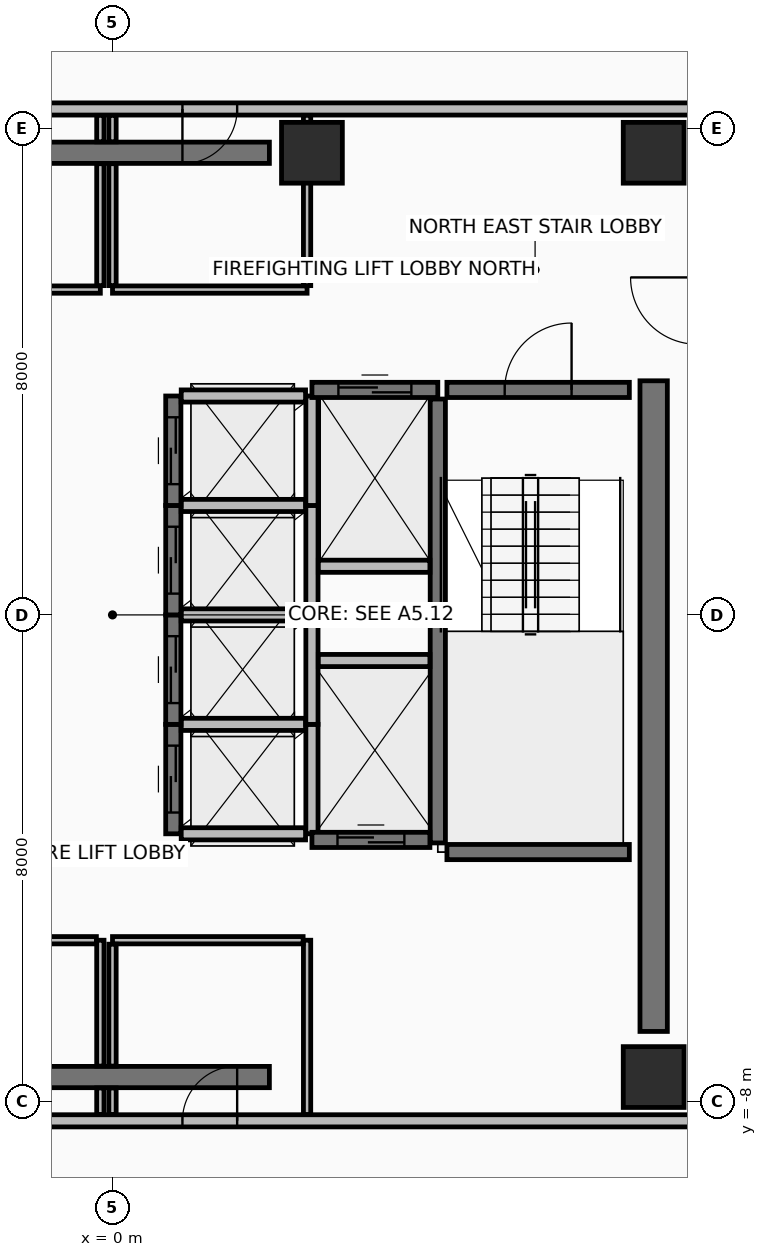
"""IFC4 building model, lengths in metres.
Left out: names, types, materials, properties, quantities, classifications, styles, units other than length and angle.
Written with IfcOpenShell. Run it as: python <this file> out.ifc"""

import sys

from ifc_helpers import new_model, si_unit, direction, frame, frame_2d, origin, origin_2d, place, context, subcontext, project, spatial, rectangle, extrude, element, fill, save


model = new_model("IFC4")
c1 = context("Model", 3, precision=1e-05, world=origin(), true_north=direction((0.0, 1.0)))
c2 = subcontext(c1, "Body", "Model", "MODEL_VIEW")
j1 = project(units=[si_unit("LENGTHUNIT", "METRE"), si_unit("PLANEANGLEUNIT", "RADIAN")], contexts=[c1])
p1 = place(None, origin())
s1 = spatial("IfcSite", under=j1, at=p1, CompositionType="ELEMENT")
p2 = place(p1, origin())
s2 = spatial("IfcBuilding", under=s1, at=p2, CompositionType="ELEMENT")
p3 = place(p2, frame((0.0, 0.0, 241.45)))
s3 = spatial("IfcBuildingStorey", under=s2, at=p3, CompositionType="ELEMENT", Elevation=241.45)
for number, where, z_axis, x_axis in (
    (1, (8.9, -7.6, 0.0), (0.0, 0.0, 1.0), (1.0, 0.0, 0.0)),
    (2, (8.9, 7.6, 0.0), (0.0, 0.0, 1.0), (1.0, 0.0, 0.0)),
    (3, (3.28, 7.6, 0.0), (0.0, 0.0, 1.0), (1.0, 0.0, 0.0)),
):
    element("IfcColumn", number, at=place(p3, frame(where, z_axis=z_axis, x_axis=x_axis)), inside=s3, PredefinedType="COLUMN", context=c2, shape_type="SweptSolid", body=[
        extrude(rectangle(XDim=1.0, YDim=1.0, at=origin_2d()), origin(), (0.0, 0.0, 1.0), 3.6),
    ])
for number, where, z_axis, x_axis in (
    (4, (-2.8, -7.6, 0.0), (0.0, 0.0, 1.0), (1.0, 0.0, 0.0)),
    (5, (-2.8, 7.6, 0.0), (0.0, 0.0, 1.0), (1.0, 0.0, 0.0)),
):
    element("IfcWall", number, at=place(p3, frame(where, z_axis=z_axis, x_axis=x_axis)), inside=s3, PredefinedType="SHEAR", context=c2, shape_type="SweptSolid", body=[
        extrude(rectangle(XDim=5.38, YDim=0.35, at=frame_2d((2.69, 0.0))), origin(), (0.0, 0.0, 1.0), 3.42),
    ])
p4 = place(p3, frame((8.9, -6.85, 0.0), z_axis=(0.0, 0.0, 1.0), x_axis=(0.0, 1.0, 0.0)))
e6 = element("IfcWall", 6, at=p4, inside=s3, PredefinedType="SHEAR", context=c2, shape_type="SweptSolid", body=[
    extrude(rectangle(XDim=10.7, YDim=0.45, at=frame_2d((5.35, 0.0))), origin(), (0.0, 0.0, 1.0), 3.42),
])
p5 = place(p3, frame((-9.62, -8.32, 0.0), z_axis=(0.0, 0.0, 1.0), x_axis=(1.0, 0.0, 0.0)))
e7 = element("IfcWall", 7, at=p5, inside=s3, PredefinedType="PARTITIONING", context=c2, shape_type="SweptSolid", body=[
    extrude(rectangle(XDim=19.24, YDim=0.2, at=frame_2d((9.62, 0.0))), origin(), (0.0, 0.0, 1.0), 2.915),
])
p6 = place(p5, frame((7.37, 0.0, 0.0)))
e8 = element("IfcOpeningElement", 8, at=p6, cuts=e7, PredefinedType="OPENING", context=c2, shape_type="SweptSolid", body=[
    extrude(rectangle(XDim=0.9, YDim=2.1, at=frame_2d((0.45, 1.05))), frame((0.0, 0.11, 0.0), z_axis=(0.0, -1.0, 0.0), x_axis=(1.0, 0.0, 0.0)), (0.0, 0.0, 1.0), 0.22),
])
p7 = place(p5, frame((10.77, 0.0, 0.0)))
e9 = element("IfcOpeningElement", 9, at=p7, cuts=e7, PredefinedType="OPENING", context=c2, shape_type="SweptSolid", body=[
    extrude(rectangle(XDim=0.9, YDim=2.1, at=frame_2d((0.45, 1.05))), frame((0.0, 0.11, 0.0), z_axis=(0.0, -1.0, 0.0), x_axis=(1.0, 0.0, 0.0)), (0.0, 0.0, 1.0), 0.22),
])
p8 = place(p3, frame((9.62, 8.32, 0.0), z_axis=(0.0, 0.0, 1.0), x_axis=(-1.0, 0.0, 0.0)))
e10 = element("IfcWall", 10, at=p8, inside=s3, PredefinedType="PARTITIONING", context=c2, shape_type="SweptSolid", body=[
    extrude(rectangle(XDim=19.24, YDim=0.2, at=frame_2d((9.62, 0.0))), origin(), (0.0, 0.0, 1.0), 2.915),
])
p9 = place(p8, frame((10.97, 0.0, 0.0)))
e11 = element("IfcOpeningElement", 11, at=p9, cuts=e10, PredefinedType="OPENING", context=c2, shape_type="SweptSolid", body=[
    extrude(rectangle(XDim=0.9, YDim=2.1, at=frame_2d((0.45, 1.05))), frame((0.0, 0.11, 0.0), z_axis=(0.0, -1.0, 0.0), x_axis=(1.0, 0.0, 0.0)), (0.0, 0.0, 1.0), 0.22),
])
p10 = place(p8, frame((7.57, 0.0, 0.0)))
e12 = element("IfcOpeningElement", 12, at=p10, cuts=e10, PredefinedType="OPENING", context=c2, shape_type="SweptSolid", body=[
    extrude(rectangle(XDim=0.9, YDim=2.1, at=frame_2d((0.45, 1.05))), frame((0.0, 0.11, 0.0), z_axis=(0.0, -1.0, 0.0), x_axis=(1.0, 0.0, 0.0)), (0.0, 0.0, 1.0), 0.22),
])
p11 = place(p8, frame((15.02, 0.0, 0.0)))
e13 = element("IfcOpeningElement", 13, at=p11, cuts=e10, PredefinedType="OPENING", context=c2, shape_type="SweptSolid", body=[
    extrude(rectangle(XDim=0.9, YDim=2.1, at=frame_2d((0.45, 1.05))), frame((0.0, 0.11, 0.0), z_axis=(0.0, -1.0, 0.0), x_axis=(1.0, 0.0, 0.0)), (0.0, 0.0, 1.0), 0.22),
])
p12 = place(p3, frame((5.35, -3.75, 0.0), z_axis=(0.0, 0.0, 1.0), x_axis=(0.0, 1.0, 0.0)))
e14 = element("IfcWall", 14, at=p12, inside=s3, PredefinedType="SHEAR", context=c2, shape_type="SweptSolid", body=[
    extrude(rectangle(XDim=7.3, YDim=0.25, at=frame_2d((3.65, 0.0))), origin(), (0.0, 0.0, 1.0), 3.42),
])
p13 = place(p3, frame((5.5, 3.7, 0.0), z_axis=(0.0, 0.0, 1.0), x_axis=(1.0, 0.0, 0.0)))
e15 = element("IfcWall", 15, at=p13, inside=s3, PredefinedType="SHEAR", context=c2, shape_type="SweptSolid", body=[
    extrude(rectangle(XDim=3.0, YDim=0.25, at=frame_2d((1.5, 0.0))), origin(), (0.0, 0.0, 1.0), 3.42),
])
p14 = place(p13, frame((0.95, 0.0, 0.0)))
e16 = element("IfcOpeningElement", 16, at=p14, cuts=e15, PredefinedType="OPENING", context=c2, shape_type="SweptSolid", body=[
    extrude(rectangle(XDim=1.1, YDim=2.15, at=frame_2d((0.55, 1.075))), frame((0.0, 0.135, 0.0), z_axis=(0.0, -1.0, 0.0), x_axis=(1.0, 0.0, 0.0)), (0.0, 0.0, 1.0), 0.27),
])
p15 = place(p3, frame((5.5, -3.9, 0.0), z_axis=(0.0, 0.0, 1.0), x_axis=(1.0, 0.0, 0.0)))
e17 = element("IfcWall", 17, at=p15, inside=s3, PredefinedType="SHEAR", context=c2, shape_type="SweptSolid", body=[
    extrude(rectangle(XDim=3.0, YDim=0.25, at=frame_2d((1.5, 0.0))), origin(), (0.0, 0.0, 1.0), 3.42),
])
p16 = place(p3, frame((1.0, -3.6, 0.0), z_axis=(0.0, 0.0, 1.0), x_axis=(0.0, 1.0, 0.0)))
e18 = element("IfcWall", 18, at=p16, inside=s3, PredefinedType="SHEAR", context=c2, shape_type="SweptSolid", body=[
    extrude(rectangle(XDim=1.8, YDim=0.25, at=frame_2d((0.9, 0.0))), origin(), (0.0, 0.0, 1.0), 3.42),
])
p17 = place(p16, frame((0.35, 0.0, 0.0)))
e19 = element("IfcOpeningElement", 19, at=p17, cuts=e18, PredefinedType="OPENING", context=c2, shape_type="SweptSolid", body=[
    extrude(rectangle(XDim=1.1, YDim=2.2, at=frame_2d((0.55, 1.1))), frame((0.0, 0.135, 0.0), z_axis=(0.0, -1.0, 0.0), x_axis=(1.0, 0.0, 0.0)), (0.0, 0.0, 1.0), 0.27),
])
p18 = place(p3, frame((3.28, -3.6, 0.0), z_axis=(0.0, 0.0, 1.0), x_axis=(0.0, 1.0, 0.0)))
e20 = element("IfcWall", 20, at=p18, inside=s3, PredefinedType="PARTITIONING", context=c2, shape_type="SweptSolid", body=[
    extrude(rectangle(XDim=1.8, YDim=0.2, at=frame_2d((0.9, 0.0))), origin(), (0.0, 0.0, 1.0), 3.42),
])
for number, where, z_axis, x_axis in (
    (21, (1.13, -3.6, 0.0), (0.0, 0.0, 1.0), (1.0, 0.0, 0.0)),
    (22, (1.13, -1.8, 0.0), (0.0, 0.0, 1.0), (1.0, 0.0, 0.0)),
):
    element("IfcWall", number, at=place(p3, frame(where, z_axis=z_axis, x_axis=x_axis)), inside=s3, PredefinedType="PARTITIONING", context=c2, shape_type="SweptSolid", body=[
        extrude(rectangle(XDim=2.045, YDim=0.2, at=frame_2d((1.022, 0.0))), origin(), (0.0, 0.0, 1.0), 3.42),
    ])
p19 = place(p3, frame((1.0, -1.8, 0.0), z_axis=(0.0, 0.0, 1.0), x_axis=(0.0, 1.0, 0.0)))
e23 = element("IfcWall", 23, at=p19, inside=s3, PredefinedType="SHEAR", context=c2, shape_type="SweptSolid", body=[
    extrude(rectangle(XDim=1.8, YDim=0.25, at=frame_2d((0.9, 0.0))), origin(), (0.0, 0.0, 1.0), 3.42),
])
p20 = place(p19, frame((0.35, 0.0, 0.0)))
e24 = element("IfcOpeningElement", 24, at=p20, cuts=e23, PredefinedType="OPENING", context=c2, shape_type="SweptSolid", body=[
    extrude(rectangle(XDim=1.1, YDim=2.2, at=frame_2d((0.55, 1.1))), frame((0.0, 0.135, 0.0), z_axis=(0.0, -1.0, 0.0), x_axis=(1.0, 0.0, 0.0)), (0.0, 0.0, 1.0), 0.27),
])
p21 = place(p3, frame((3.28, -1.8, 0.0), z_axis=(0.0, 0.0, 1.0), x_axis=(0.0, 1.0, 0.0)))
e25 = element("IfcWall", 25, at=p21, inside=s3, PredefinedType="PARTITIONING", context=c2, shape_type="SweptSolid", body=[
    extrude(rectangle(XDim=1.8, YDim=0.2, at=frame_2d((0.9, 0.0))), origin(), (0.0, 0.0, 1.0), 3.42),
])
p22 = place(p3, frame((1.13, 0.0, 0.0), z_axis=(0.0, 0.0, 1.0), x_axis=(1.0, 0.0, 0.0)))
e26 = element("IfcWall", 26, at=p22, inside=s3, PredefinedType="PARTITIONING", context=c2, shape_type="SweptSolid", body=[
    extrude(rectangle(XDim=2.045, YDim=0.2, at=frame_2d((1.022, 0.0))), origin(), (0.0, 0.0, 1.0), 3.42),
])
p23 = place(p3, frame((1.0, 0.0, 0.0), z_axis=(0.0, 0.0, 1.0), x_axis=(0.0, 1.0, 0.0)))
e27 = element("IfcWall", 27, at=p23, inside=s3, PredefinedType="SHEAR", context=c2, shape_type="SweptSolid", body=[
    extrude(rectangle(XDim=1.8, YDim=0.25, at=frame_2d((0.9, 0.0))), origin(), (0.0, 0.0, 1.0), 3.42),
])
p24 = place(p23, frame((0.35, 0.0, 0.0)))
e28 = element("IfcOpeningElement", 28, at=p24, cuts=e27, PredefinedType="OPENING", context=c2, shape_type="SweptSolid", body=[
    extrude(rectangle(XDim=1.1, YDim=2.2, at=frame_2d((0.55, 1.1))), frame((0.0, 0.135, 0.0), z_axis=(0.0, -1.0, 0.0), x_axis=(1.0, 0.0, 0.0)), (0.0, 0.0, 1.0), 0.27),
])
p25 = place(p3, frame((3.28, 0.0, 0.0), z_axis=(0.0, 0.0, 1.0), x_axis=(0.0, 1.0, 0.0)))
e29 = element("IfcWall", 29, at=p25, inside=s3, PredefinedType="PARTITIONING", context=c2, shape_type="SweptSolid", body=[
    extrude(rectangle(XDim=1.8, YDim=0.2, at=frame_2d((0.9, 0.0))), origin(), (0.0, 0.0, 1.0), 3.42),
])
p26 = place(p3, frame((1.13, 1.8, 0.0), z_axis=(0.0, 0.0, 1.0), x_axis=(1.0, 0.0, 0.0)))
e30 = element("IfcWall", 30, at=p26, inside=s3, PredefinedType="PARTITIONING", context=c2, shape_type="SweptSolid", body=[
    extrude(rectangle(XDim=2.045, YDim=0.2, at=frame_2d((1.022, 0.0))), origin(), (0.0, 0.0, 1.0), 3.42),
])
p27 = place(p3, frame((1.0, 1.8, 0.0), z_axis=(0.0, 0.0, 1.0), x_axis=(0.0, 1.0, 0.0)))
e31 = element("IfcWall", 31, at=p27, inside=s3, PredefinedType="SHEAR", context=c2, shape_type="SweptSolid", body=[
    extrude(rectangle(XDim=1.8, YDim=0.25, at=frame_2d((0.9, 0.0))), origin(), (0.0, 0.0, 1.0), 3.42),
])
p28 = place(p27, frame((0.35, 0.0, 0.0)))
e32 = element("IfcOpeningElement", 32, at=p28, cuts=e31, PredefinedType="OPENING", context=c2, shape_type="SweptSolid", body=[
    extrude(rectangle(XDim=1.1, YDim=2.2, at=frame_2d((0.55, 1.1))), frame((0.0, 0.135, 0.0), z_axis=(0.0, -1.0, 0.0), x_axis=(1.0, 0.0, 0.0)), (0.0, 0.0, 1.0), 0.27),
])
p29 = place(p3, frame((3.28, 1.8, 0.0), z_axis=(0.0, 0.0, 1.0), x_axis=(0.0, 1.0, 0.0)))
e33 = element("IfcWall", 33, at=p29, inside=s3, PredefinedType="PARTITIONING", context=c2, shape_type="SweptSolid", body=[
    extrude(rectangle(XDim=1.8, YDim=0.2, at=frame_2d((0.9, 0.0))), origin(), (0.0, 0.0, 1.0), 3.42),
])
p30 = place(p3, frame((1.13, 3.6, 0.0), z_axis=(0.0, 0.0, 1.0), x_axis=(1.0, 0.0, 0.0)))
e34 = element("IfcWall", 34, at=p30, inside=s3, PredefinedType="PARTITIONING", context=c2, shape_type="SweptSolid", body=[
    extrude(rectangle(XDim=2.045, YDim=0.2, at=frame_2d((1.022, 0.0))), origin(), (0.0, 0.0, 1.0), 2.715),
])
p31 = place(p3, frame((3.28, 3.7, 0.0), z_axis=(0.0, 0.0, 1.0), x_axis=(1.0, 0.0, 0.0)))
e35 = element("IfcWall", 35, at=p31, inside=s3, PredefinedType="SHEAR", context=c2, shape_type="SweptSolid", body=[
    extrude(rectangle(XDim=2.07, YDim=0.25, at=frame_2d((1.035, 0.0))), origin(), (0.0, 0.0, 1.0), 3.42),
])
p32 = place(p31, frame((0.435, 0.0, 0.0)))
e36 = element("IfcOpeningElement", 36, at=p32, cuts=e35, PredefinedType="OPENING", context=c2, shape_type="SweptSolid", body=[
    extrude(rectangle(XDim=1.2, YDim=2.2, at=frame_2d((0.6, 1.1))), frame((0.0, 0.135, 0.0), z_axis=(0.0, -1.0, 0.0), x_axis=(1.0, 0.0, 0.0)), (0.0, 0.0, 1.0), 0.27),
])
p33 = place(p3, frame((3.385, 0.8, 0.0), z_axis=(0.0, 0.0, 1.0), x_axis=(1.0, 0.0, 0.0)))
e37 = element("IfcWall", 37, at=p33, inside=s3, PredefinedType="PARTITIONING", context=c2, shape_type="SweptSolid", body=[
    extrude(rectangle(XDim=1.835, YDim=0.2, at=frame_2d((0.917, 0.0))), origin(), (0.0, 0.0, 1.0), 3.42),
])
p34 = place(p3, frame((3.28, -3.7, 0.0), z_axis=(0.0, 0.0, 1.0), x_axis=(1.0, 0.0, 0.0)))
e38 = element("IfcWall", 38, at=p34, inside=s3, PredefinedType="SHEAR", context=c2, shape_type="SweptSolid", body=[
    extrude(rectangle(XDim=1.94, YDim=0.25, at=frame_2d((0.97, 0.0))), origin(), (0.0, 0.0, 1.0), 3.42),
])
p35 = place(p34, frame((0.42, 0.0, 0.0)))
e39 = element("IfcOpeningElement", 39, at=p35, cuts=e38, PredefinedType="OPENING", context=c2, shape_type="SweptSolid", body=[
    extrude(rectangle(XDim=1.1, YDim=2.2, at=frame_2d((0.55, 1.1))), frame((0.0, 0.135, 0.0), z_axis=(0.0, -1.0, 0.0), x_axis=(1.0, 0.0, 0.0)), (0.0, 0.0, 1.0), 0.27),
])
p36 = place(p3, frame((3.385, -0.75, 0.0), z_axis=(0.0, 0.0, 1.0), x_axis=(1.0, 0.0, 0.0)))
e40 = element("IfcWall", 40, at=p36, inside=s3, PredefinedType="PARTITIONING", context=c2, shape_type="SweptSolid", body=[
    extrude(rectangle(XDim=1.835, YDim=0.2, at=frame_2d((0.917, 0.0))), origin(), (0.0, 0.0, 1.0), 3.42),
])
p37 = place(p3, frame((-0.2, -8.215, 0.0), z_axis=(0.0, 0.0, 1.0), x_axis=(0.0, 1.0, 0.0)))
e41 = element("IfcWall", 41, at=p37, inside=s3, PredefinedType="PARTITIONING", context=c2, shape_type="SweptSolid", body=[
    extrude(rectangle(XDim=0.435, YDim=0.12, at=frame_2d((0.218, 0.0))), origin(), (0.0, 0.0, 1.0), 2.715),
])
p38 = place(p3, frame((-0.2, -7.42, 0.0), z_axis=(0.0, 0.0, 1.0), x_axis=(0.0, 1.0, 0.0)))
e42 = element("IfcWall", 42, at=p38, inside=s3, PredefinedType="PARTITIONING", context=c2, shape_type="SweptSolid", body=[
    extrude(rectangle(XDim=2.07, YDim=0.12, at=frame_2d((1.035, 0.0))), origin(), (0.0, 0.0, 1.0), 2.715),
])
p39 = place(p3, frame((-0.265, -5.35, 0.0), z_axis=(0.0, 0.0, 1.0), x_axis=(-1.0, 0.0, 0.0)))
e43 = element("IfcWall", 43, at=p39, inside=s3, PredefinedType="PARTITIONING", context=c2, shape_type="SweptSolid", body=[
    extrude(rectangle(XDim=3.135, YDim=0.12, at=frame_2d((1.567, 0.0))), origin(), (0.0, 0.0, 1.0), 2.715),
])
p40 = place(p3, frame((3.2, -8.215, 0.0), z_axis=(0.0, 0.0, 1.0), x_axis=(0.0, 1.0, 0.0)))
e44 = element("IfcWall", 44, at=p40, inside=s3, PredefinedType="PARTITIONING", context=c2, shape_type="SweptSolid", body=[
    extrude(rectangle(XDim=2.865, YDim=0.12, at=frame_2d((1.433, 0.0))), origin(), (0.0, 0.0, 1.0), 2.715),
])
p41 = place(p3, frame((3.135, -5.35, 0.0), z_axis=(0.0, 0.0, 1.0), x_axis=(-1.0, 0.0, 0.0)))
e45 = element("IfcWall", 45, at=p41, inside=s3, PredefinedType="PARTITIONING", context=c2, shape_type="SweptSolid", body=[
    extrude(rectangle(XDim=3.135, YDim=0.12, at=frame_2d((1.567, 0.0))), origin(), (0.0, 0.0, 1.0), 3.42),
])
p42 = place(p3, frame((0.0, -5.415, 0.0), z_axis=(0.0, 0.0, 1.0), x_axis=(0.0, -1.0, 0.0)))
e46 = element("IfcWall", 46, at=p42, inside=s3, PredefinedType="PARTITIONING", context=c2, shape_type="SweptSolid", body=[
    extrude(rectangle(XDim=2.005, YDim=0.12, at=frame_2d((1.002, 0.0))), origin(), (0.0, 0.0, 1.0), 2.715),
])
p43 = place(p3, frame((0.0, -7.78, 0.0), z_axis=(0.0, 0.0, 1.0), x_axis=(0.0, -1.0, 0.0)))
e47 = element("IfcWall", 47, at=p43, inside=s3, PredefinedType="PARTITIONING", context=c2, shape_type="SweptSolid", body=[
    extrude(rectangle(XDim=0.435, YDim=0.12, at=frame_2d((0.218, 0.0))), origin(), (0.0, 0.0, 1.0), 2.715),
])
p44 = place(p3, frame((-3.4, 5.35, 0.0), z_axis=(0.0, 0.0, 1.0), x_axis=(1.0, 0.0, 0.0)))
e48 = element("IfcWall", 48, at=p44, inside=s3, PredefinedType="PARTITIONING", context=c2, shape_type="SweptSolid", body=[
    extrude(rectangle(XDim=3.2, YDim=0.12, at=frame_2d((1.6, 0.0))), origin(), (0.0, 0.0, 1.0), 3.42),
])
p45 = place(p3, frame((-0.2, 5.415, 0.0), z_axis=(0.0, 0.0, 1.0), x_axis=(0.0, 1.0, 0.0)))
e49 = element("IfcWall", 49, at=p45, inside=s3, PredefinedType="PARTITIONING", context=c2, shape_type="SweptSolid", body=[
    extrude(rectangle(XDim=2.005, YDim=0.12, at=frame_2d((1.002, 0.0))), origin(), (0.0, 0.0, 1.0), 2.715),
])
p46 = place(p3, frame((-0.2, 7.78, 0.0), z_axis=(0.0, 0.0, 1.0), x_axis=(0.0, 1.0, 0.0)))
e50 = element("IfcWall", 50, at=p46, inside=s3, PredefinedType="PARTITIONING", context=c2, shape_type="SweptSolid", body=[
    extrude(rectangle(XDim=0.435, YDim=0.12, at=frame_2d((0.218, 0.0))), origin(), (0.0, 0.0, 1.0), 2.715),
])
p47 = place(p3, frame((0.0, 5.35, 0.0), z_axis=(0.0, 0.0, 1.0), x_axis=(1.0, 0.0, 0.0)))
e51 = element("IfcWall", 51, at=p47, inside=s3, PredefinedType="PARTITIONING", context=c2, shape_type="SweptSolid", body=[
    extrude(rectangle(XDim=3.2, YDim=0.12, at=frame_2d((1.6, 0.0))), origin(), (0.0, 0.0, 1.0), 2.715),
])
p48 = place(p3, frame((3.2, 5.415, 0.0), z_axis=(0.0, 0.0, 1.0), x_axis=(0.0, 1.0, 0.0)))
e52 = element("IfcWall", 52, at=p48, inside=s3, PredefinedType="PARTITIONING", context=c2, shape_type="SweptSolid", body=[
    extrude(rectangle(XDim=2.8, YDim=0.12, at=frame_2d((1.4, 0.0))), origin(), (0.0, 0.0, 1.0), 2.715),
])
p49 = place(p3, frame((0.0, 8.215, 0.0), z_axis=(0.0, 0.0, 1.0), x_axis=(0.0, -1.0, 0.0)))
e53 = element("IfcWall", 53, at=p49, inside=s3, PredefinedType="PARTITIONING", context=c2, shape_type="SweptSolid", body=[
    extrude(rectangle(XDim=0.435, YDim=0.12, at=frame_2d((0.218, 0.0))), origin(), (0.0, 0.0, 1.0), 2.715),
])
p50 = place(p3, frame((0.0, 7.42, 0.0), z_axis=(0.0, 0.0, 1.0), x_axis=(0.0, -1.0, 0.0)))
e54 = element("IfcWall", 54, at=p50, inside=s3, PredefinedType="PARTITIONING", context=c2, shape_type="SweptSolid", body=[
    extrude(rectangle(XDim=2.005, YDim=0.12, at=frame_2d((1.002, 0.0))), origin(), (0.0, 0.0, 1.0), 2.715),
])
p51 = place(p14, frame((1.1, 0.0, 0.0), z_axis=(0.0, 0.0, 1.0), x_axis=(-1.0, 0.0, 0.0)))
e55 = element("IfcDoor", 55, at=p51, inside=s3, OperationType="SINGLE_SWING_LEFT", PredefinedType="DOOR", context=c2, shape_type="SweptSolid", body=[
    extrude(rectangle(XDim=1.1, YDim=2.15, at=frame_2d((0.55, 1.075))), frame((0.0, 0.025, 0.0), z_axis=(0.0, -1.0, 0.0), x_axis=(1.0, 0.0, 0.0)), (0.0, 0.0, 1.0), 0.05),
])
fill(e16, e55)
p52 = place(p17, origin())
e56 = element("IfcDoor", 56, at=p52, inside=s3, OperationType="SLIDING_TO_LEFT", PredefinedType="DOOR", context=c2, shape_type="SweptSolid", body=[
    extrude(rectangle(XDim=1.1, YDim=2.2, at=frame_2d((0.55, 1.1))), frame((0.0, 0.025, 0.0), z_axis=(0.0, -1.0, 0.0), x_axis=(1.0, 0.0, 0.0)), (0.0, 0.0, 1.0), 0.05),
])
fill(e19, e56)
p53 = place(p20, origin())
e57 = element("IfcDoor", 57, at=p53, inside=s3, OperationType="SLIDING_TO_LEFT", PredefinedType="DOOR", context=c2, shape_type="SweptSolid", body=[
    extrude(rectangle(XDim=1.1, YDim=2.2, at=frame_2d((0.55, 1.1))), frame((0.0, 0.025, 0.0), z_axis=(0.0, -1.0, 0.0), x_axis=(1.0, 0.0, 0.0)), (0.0, 0.0, 1.0), 0.05),
])
fill(e24, e57)
p54 = place(p24, origin())
e58 = element("IfcDoor", 58, at=p54, inside=s3, OperationType="SLIDING_TO_LEFT", PredefinedType="DOOR", context=c2, shape_type="SweptSolid", body=[
    extrude(rectangle(XDim=1.1, YDim=2.2, at=frame_2d((0.55, 1.1))), frame((0.0, 0.025, 0.0), z_axis=(0.0, -1.0, 0.0), x_axis=(1.0, 0.0, 0.0)), (0.0, 0.0, 1.0), 0.05),
])
fill(e28, e58)
p55 = place(p28, origin())
e59 = element("IfcDoor", 59, at=p55, inside=s3, OperationType="SLIDING_TO_LEFT", PredefinedType="DOOR", context=c2, shape_type="SweptSolid", body=[
    extrude(rectangle(XDim=1.1, YDim=2.2, at=frame_2d((0.55, 1.1))), frame((0.0, 0.025, 0.0), z_axis=(0.0, -1.0, 0.0), x_axis=(1.0, 0.0, 0.0)), (0.0, 0.0, 1.0), 0.05),
])
fill(e32, e59)
p56 = place(p32, origin())
e60 = element("IfcDoor", 60, at=p56, inside=s3, OperationType="SLIDING_TO_RIGHT", PredefinedType="DOOR", context=c2, shape_type="SweptSolid", body=[
    extrude(rectangle(XDim=1.2, YDim=2.2, at=frame_2d((0.6, 1.1))), frame((0.0, 0.025, 0.0), z_axis=(0.0, -1.0, 0.0), x_axis=(1.0, 0.0, 0.0)), (0.0, 0.0, 1.0), 0.05),
])
fill(e36, e60)
p57 = place(p35, origin())
e61 = element("IfcDoor", 61, at=p57, inside=s3, OperationType="SLIDING_TO_LEFT", PredefinedType="DOOR", context=c2, shape_type="SweptSolid", body=[
    extrude(rectangle(XDim=1.1, YDim=2.2, at=frame_2d((0.55, 1.1))), frame((0.0, 0.025, 0.0), z_axis=(0.0, -1.0, 0.0), x_axis=(1.0, 0.0, 0.0)), (0.0, 0.0, 1.0), 0.05),
])
fill(e39, e61)
p58 = place(p7, frame((0.9, 0.0, 0.0), z_axis=(0.0, 0.0, 1.0), x_axis=(-1.0, 0.0, 0.0)))
e62 = element("IfcDoor", 62, at=p58, inside=s3, OperationType="SINGLE_SWING_LEFT", PredefinedType="DOOR", context=c2, shape_type="SweptSolid", body=[
    extrude(rectangle(XDim=0.9, YDim=2.1, at=frame_2d((0.45, 1.05))), frame((0.0, 0.025, 0.0), z_axis=(0.0, -1.0, 0.0), x_axis=(1.0, 0.0, 0.0)), (0.0, 0.0, 1.0), 0.05),
])
fill(e9, e62)
p59 = place(p10, frame((0.9, 0.0, 0.0), z_axis=(0.0, 0.0, 1.0), x_axis=(-1.0, 0.0, 0.0)))
e63 = element("IfcDoor", 63, at=p59, inside=s3, OperationType="SINGLE_SWING_LEFT", PredefinedType="DOOR", context=c2, shape_type="SweptSolid", body=[
    extrude(rectangle(XDim=0.9, YDim=2.1, at=frame_2d((0.45, 1.05))), frame((0.0, 0.025, 0.0), z_axis=(0.0, -1.0, 0.0), x_axis=(1.0, 0.0, 0.0)), (0.0, 0.0, 1.0), 0.05),
])
fill(e12, e63)
save(model, sys.argv[1])
